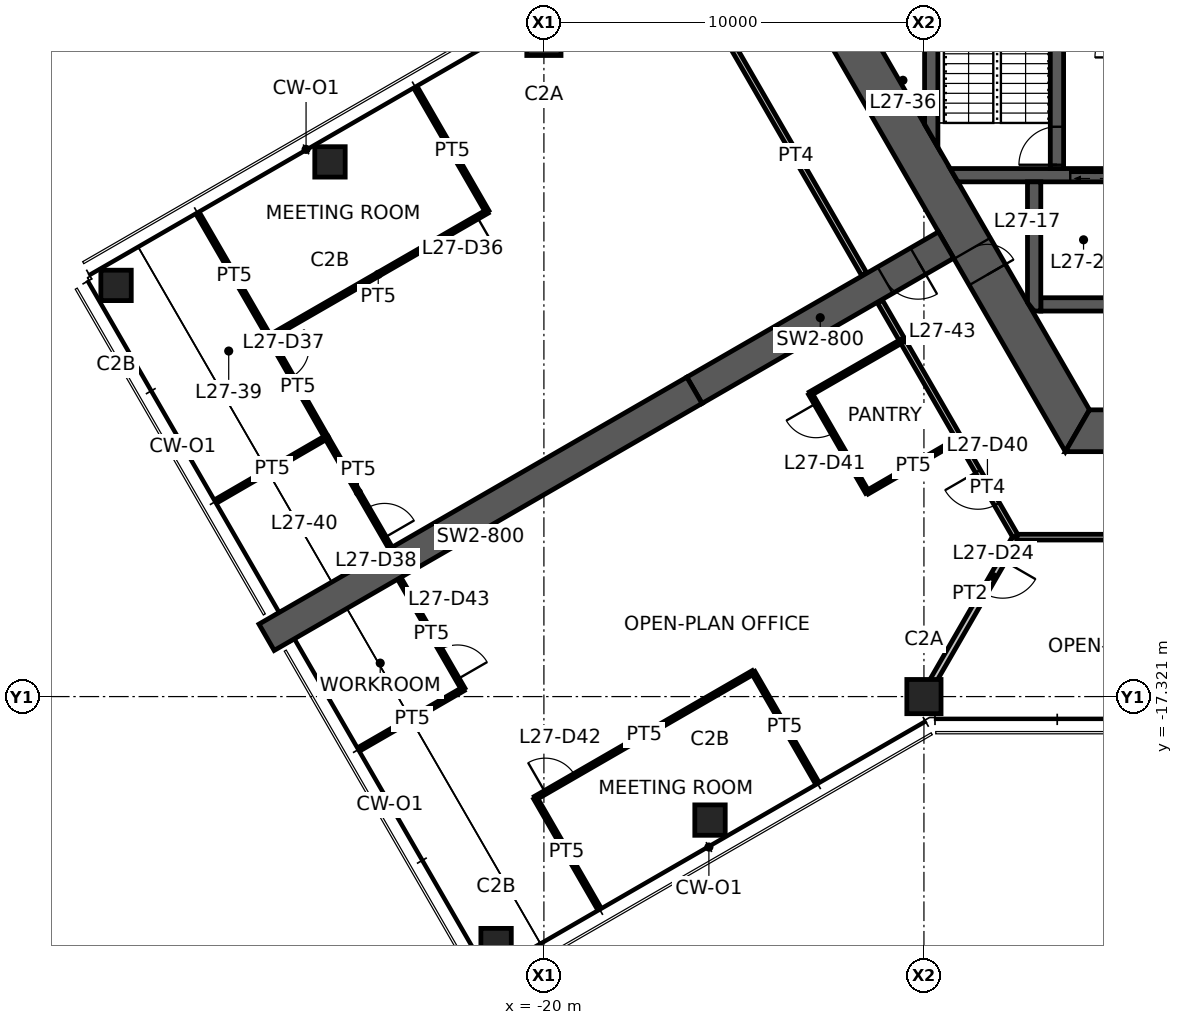
"""IFC4 building model, lengths in metres.
Left out: names, types, materials, properties, quantities, classifications, styles, units other than length and angle.
Written with IfcOpenShell. Run it as: python <this file> out.ifc"""

import sys

from ifc_helpers import new_model, si_unit, direction, frame, frame_2d, origin, origin_2d, place, context, subcontext, project, spatial, polyline, rectangle, hollow_rectangle, outline, extrude, element, fill, save


model = new_model("IFC4")
c1 = context("Model", 3, precision=1e-05, world=origin(), true_north=direction((0.0, 1.0)))
c2 = subcontext(c1, "Body", "Model", "MODEL_VIEW")
j1 = project(units=[si_unit("LENGTHUNIT", "METRE"), si_unit("PLANEANGLEUNIT", "RADIAN")], contexts=[c1])
p1 = place(None, origin())
s1 = spatial("IfcSite", under=j1, at=p1, CompositionType="ELEMENT")
p2 = place(p1, origin())
s2 = spatial("IfcBuilding", under=s1, at=p2, CompositionType="ELEMENT")
p3 = place(p2, frame((0.0, 0.0, 108.0)))
s3 = spatial("IfcBuildingStorey", under=s2, at=p3, CompositionType="ELEMENT", Elevation=108.0)
for number, where, z_axis, x_axis in (
    (1, (-20.0, 0.0, 0.0), (0.0, 0.0, 1.0), (1.0, 0.0, 0.0)),
    (2, (-10.0, -17.321, 0.0), (0.0, 0.0, 1.0), (1.0, 0.0, 0.0)),
):
    element("IfcColumn", number, at=place(p3, frame(where, z_axis=z_axis, x_axis=x_axis)), inside=s3, PredefinedType="COLUMN", context=c2, shape_type="SweptSolid", body=[
        extrude(hollow_rectangle(XDim=0.9, YDim=0.9, WallThickness=0.055, at=origin_2d()), origin(), (0.0, 0.0, 1.0), 3.9),
    ])
for number, where, z_axis, x_axis in (
    (3, (-25.629, -3.25, 0.0), (0.0, 0.0, 1.0), (1.0, 0.0, 0.0)),
    (4, (-31.258, -6.5, 0.0), (0.0, 0.0, 1.0), (1.0, 0.0, 0.0)),
    (5, (-15.629, -20.571, 0.0), (0.0, 0.0, 1.0), (1.0, 0.0, 0.0)),
    (6, (-21.258, -23.821, 0.0), (0.0, 0.0, 1.0), (1.0, 0.0, 0.0)),
):
    element("IfcColumn", number, at=place(p3, frame(where, z_axis=z_axis, x_axis=x_axis)), inside=s3, PredefinedType="COLUMN", context=c2, shape_type="SweptSolid", body=[
        extrude(hollow_rectangle(XDim=0.8, YDim=0.8, WallThickness=0.045, at=origin_2d()), origin(), (0.0, 0.0, 1.0), 3.9),
    ])
p4 = place(p3, frame((-11.922, 0.0, 0.0), z_axis=(0.0, 0.0, 1.0), x_axis=(0.500004296715, -0.866022923061, 0.0)))
e7 = element("IfcWall", 7, at=p4, inside=s3, PredefinedType="SHEAR", context=c2, shape_type="SweptSolid", body=[
    extrude(outline(polyline([(-0.318, -0.55), (6.381, -0.55), (7.181, -0.55), (12.24, -0.55), (11.605, 0.55), (7.181, 0.55), (6.381, 0.55), (0.318, 0.55), (-0.318, -0.55)])), origin(), (0.0, 0.0, 1.0), 3.9),
])
p5 = place(p4, frame((6.381, 0.0, 0.0)))
e8 = element("IfcOpeningElement", 8, at=p5, cuts=e7, PredefinedType="OPENING", context=c2, shape_type="SweptSolid", body=[
    extrude(rectangle(XDim=0.8, YDim=2.1, at=frame_2d((0.4, 1.05))), frame((0.0, 0.56, 0.0), z_axis=(0.0, -1.0, 0.0), x_axis=(1.0, 0.0, 0.0)), (0.0, 0.0, 1.0), 1.12),
])
p6 = place(p3, frame((-5.961, -10.325, 0.0), z_axis=(0.0, 0.0, 1.0), x_axis=(1.0, 0.0, 0.0)))
e9 = element("IfcWall", 9, at=p6, inside=s3, PredefinedType="SHEAR", context=c2, shape_type="SweptSolid", body=[
    extrude(outline(polyline([(-0.318, -0.55), (5.461, -0.55), (6.461, -0.55), (12.24, -0.55), (11.605, 0.55), (6.461, 0.55), (5.461, 0.55), (0.318, 0.55), (-0.318, -0.55)])), origin(), (0.0, 0.0, 1.0), 3.9),
])
p7 = place(p6, frame((5.461, 0.0, 0.0)))
e10 = element("IfcOpeningElement", 10, at=p7, cuts=e9, PredefinedType="OPENING", context=c2, shape_type="SweptSolid", body=[
    extrude(rectangle(XDim=1.0, YDim=2.1, at=frame_2d((0.5, 1.05))), frame((0.0, 0.56, 0.0), z_axis=(0.0, -1.0, 0.0), x_axis=(1.0, 0.0, 0.0)), (0.0, 0.0, 1.0), 1.12),
])
p8 = place(p3, frame((-9.418, -5.438, 0.0), z_axis=(0.0, 0.0, 1.0), x_axis=(-0.866029782078, -0.499992416496, 0.0)))
e11 = element("IfcWall", 11, at=p8, inside=s3, PredefinedType="SHEAR", context=c2, shape_type="SweptSolid", body=[
    extrude(rectangle(XDim=7.646, YDim=0.8, at=frame_2d((3.823, 0.0))), origin(), (0.0, 0.0, 1.0), 3.9),
])
p9 = place(p8, frame((0.85, 0.0, 0.0)))
e12 = element("IfcOpeningElement", 12, at=p9, cuts=e11, PredefinedType="OPENING", context=c2, shape_type="SweptSolid", body=[
    extrude(rectangle(XDim=1.0, YDim=2.1, at=frame_2d((0.5, 1.05))), frame((0.0, 0.41, 0.0), z_axis=(0.0, -1.0, 0.0), x_axis=(1.0, 0.0, 0.0)), (0.0, 0.0, 1.0), 0.82),
])
p10 = place(p3, frame((-16.039, -9.26, 0.0), z_axis=(0.0, 0.0, 1.0), x_axis=(-0.866024837091, -0.50000098154, 0.0)))
e13 = element("IfcWall", 13, at=p10, inside=s3, PredefinedType="SHEAR", context=c2, shape_type="SweptSolid", body=[
    extrude(rectangle(XDim=13.0, YDim=0.8, at=frame_2d((6.5, 0.0))), origin(), (0.0, 0.0, 1.0), 3.9),
])
p11 = place(p3, frame((-9.209, -3.6, 0.0), z_axis=(0.0, 0.0, 1.0), x_axis=(1.0, 0.0, 0.0)))
e14 = element("IfcWall", 14, at=p11, inside=s3, PredefinedType="SHEAR", context=c2, shape_type="SweptSolid", body=[
    extrude(outline(polyline([(0.101, -0.175), (3.059, -0.175), (4.359, -0.175), (5.609, -0.175), (6.709, -0.175), (7.784, -0.175), (7.784, 0.175), (6.709, 0.175), (5.609, 0.175), (4.359, 0.175), (3.059, 0.175), (-0.101, 0.175), (0.101, -0.175)])), origin(), (0.0, 0.0, 1.0), 3.9),
])
p12 = place(p11, frame((5.609, 0.0, 0.0)))
e15 = element("IfcOpeningElement", 15, at=p12, cuts=e14, PredefinedType="OPENING", context=c2, shape_type="SweptSolid", body=[
    extrude(rectangle(XDim=1.1, YDim=2.1, at=frame_2d((0.55, 1.05))), frame((0.0, 0.185, 0.0), z_axis=(0.0, -1.0, 0.0), x_axis=(1.0, 0.0, 0.0)), (0.0, 0.0, 1.0), 0.37),
])
p13 = place(p11, frame((3.059, 0.0, 0.0)))
e16 = element("IfcOpeningElement", 16, at=p13, cuts=e14, PredefinedType="OPENING", context=c2, shape_type="SweptSolid", body=[
    extrude(rectangle(XDim=1.3, YDim=2.1, at=frame_2d((0.65, 1.05))), frame((0.0, 0.185, 0.0), z_axis=(0.0, -1.0, 0.0), x_axis=(1.0, 0.0, 0.0)), (0.0, 0.0, 1.0), 0.37),
])
p14 = place(p3, frame((-6.5, -3.425, 0.0), z_axis=(0.0, 0.0, 1.0), x_axis=(0.0, 1.0, 0.0)))
e17 = element("IfcWall", 17, at=p14, inside=s3, PredefinedType="SHEAR", context=c2, shape_type="SweptSolid", body=[
    extrude(rectangle(XDim=6.85, YDim=0.35, at=frame_2d((3.425, 0.0))), origin(), (0.0, 0.0, 1.0), 3.9),
])
p15 = place(p14, frame((0.1, 0.0, 0.0)))
e18 = element("IfcOpeningElement", 18, at=p15, cuts=e17, PredefinedType="OPENING", context=c2, shape_type="SweptSolid", body=[
    extrude(rectangle(XDim=1.0, YDim=2.1, at=frame_2d((0.5, 1.05))), frame((0.0, 0.185, 0.0), z_axis=(0.0, -1.0, 0.0), x_axis=(1.0, 0.0, 0.0)), (0.0, 0.0, 1.0), 0.37),
])
p16 = place(p3, frame((-6.925, -7.0, 0.0), z_axis=(0.0, 0.0, 1.0), x_axis=(1.0, 0.0, 0.0)))
e19 = element("IfcWall", 19, at=p16, inside=s3, PredefinedType="SHEAR", context=c2, shape_type="SweptSolid", body=[
    extrude(rectangle(XDim=2.25, YDim=0.35, at=frame_2d((1.125, 0.0))), origin(), (0.0, 0.0, 1.0), 3.9),
])
p17 = place(p3, frame((-7.1, -3.775, 0.0), z_axis=(0.0, 0.0, 1.0), x_axis=(0.0, -1.0, 0.0)))
e20 = element("IfcWall", 20, at=p17, inside=s3, PredefinedType="SHEAR", context=c2, shape_type="SweptSolid", body=[
    extrude(outline(polyline([(0.0, -0.175), (3.175, -0.175), (3.4, 0.0), (3.4, 0.175), (0.0, 0.175), (0.0, -0.175)])), origin(), (0.0, 0.0, 1.0), 3.9),
])
p18 = place(p3, frame((-9.808, -2.562, 0.0), z_axis=(0.0, 0.0, 1.0), x_axis=(0.0, 1.0, 0.0)))
e21 = element("IfcWall", 21, at=p18, inside=s3, PredefinedType="SHEAR", context=c2, shape_type="SweptSolid", body=[
    extrude(outline(polyline([(-0.303, -0.175), (5.428, -0.175), (4.821, 0.175), (0.303, 0.175), (-0.303, -0.175)])), origin(), (0.0, 0.0, 1.0), 3.9),
])
p19 = place(p3, frame((-7.578, -13.125, 0.0), z_axis=(0.0, 0.0, 1.0), x_axis=(-0.500008905493, -0.866020262135, 0.0)))
e22 = element("IfcWall", 22, at=p19, inside=s3, PredefinedType="PARTITIONING", context=c2, shape_type="SweptSolid", body=[
    extrude(rectangle(XDim=4.845, YDim=0.175, at=frame_2d((2.422, 0.0))), origin(), (0.0, 0.0, 1.0), 3.05),
])
p20 = place(p19, frame((0.7, 0.0, 0.0)))
e23 = element("IfcOpeningElement", 23, at=p20, cuts=e22, PredefinedType="OPENING", context=c2, shape_type="SweptSolid", body=[
    extrude(rectangle(XDim=1.0, YDim=2.1, at=frame_2d((0.5, 1.05))), frame((0.0, 0.098, 0.0), z_axis=(0.0, -1.0, 0.0), x_axis=(1.0, 0.0, 0.0)), (0.0, 0.0, 1.0), 0.195),
])
p21 = place(p3, frame((-11.577, -6.199, 0.0), z_axis=(0.0, 0.0, 1.0), x_axis=(-0.500001961223, 0.866024271469, 0.0)))
e24 = element("IfcWall", 24, at=p21, inside=s3, PredefinedType="PARTITIONING", context=c2, shape_type="SweptSolid", body=[
    extrude(rectangle(XDim=7.158, YDim=0.15, at=frame_2d((3.579, 0.0))), origin(), (0.0, 0.0, 1.0), 2.95),
])
p22 = place(p3, frame((-27.22, -7.864, 0.0), z_axis=(0.0, 0.0, 1.0), x_axis=(-0.501296359072, 0.86527565572, 0.0)))
e25 = element("IfcWall", 25, at=p22, inside=s3, PredefinedType="PARTITIONING", context=c2, shape_type="SweptSolid", body=[
    extrude(rectangle(XDim=3.7, YDim=0.1, at=frame_2d((1.85, 0.0))), origin(), (0.0, 0.0, 1.0), 2.95),
])
p23 = place(p3, frame((-23.332, -1.37, 0.0), z_axis=(0.0, 0.0, 1.0), x_axis=(0.500013413428, -0.866017659399, 0.0)))
e26 = element("IfcWall", 26, at=p23, inside=s3, PredefinedType="PARTITIONING", context=c2, shape_type="SweptSolid", body=[
    extrude(rectangle(XDim=3.68, YDim=0.1, at=frame_2d((1.84, 0.0))), origin(), (0.0, 0.0, 1.0), 2.95),
])
p24 = place(p3, frame((-21.492, -4.557, 0.0), z_axis=(0.0, 0.0, 1.0), x_axis=(-0.866343956507, -0.499447844147, 0.0)))
e27 = element("IfcWall", 27, at=p24, inside=s3, PredefinedType="PARTITIONING", context=c2, shape_type="SweptSolid", body=[
    extrude(rectangle(XDim=6.62, YDim=0.1, at=frame_2d((3.31, 0.0))), origin(), (0.0, 0.0, 1.0), 2.95),
])
p25 = place(p24, frame((0.3, 0.0, 0.0)))
e28 = element("IfcOpeningElement", 28, at=p25, cuts=e27, PredefinedType="OPENING", context=c2, shape_type="SweptSolid", body=[
    extrude(rectangle(XDim=0.9, YDim=2.1, at=frame_2d((0.45, 1.05))), frame((0.0, 0.06, 0.0), z_axis=(0.0, -1.0, 0.0), x_axis=(1.0, 0.0, 0.0)), (0.0, 0.0, 1.0), 0.12),
])
p26 = place(p3, frame((-25.719, -10.493, 0.0), z_axis=(0.0, 0.0, 1.0), x_axis=(-0.865269267775, -0.501307384988, 0.0)))
e29 = element("IfcWall", 29, at=p26, inside=s3, PredefinedType="PARTITIONING", context=c2, shape_type="SweptSolid", body=[
    extrude(rectangle(XDim=3.301, YDim=0.1, at=frame_2d((1.65, 0.0))), origin(), (0.0, 0.0, 1.0), 2.95),
])
p27 = place(p3, frame((-27.227, -7.863, 0.0), z_axis=(0.0, 0.0, 1.0), x_axis=(0.495913871635, -0.868371712989, 0.0)))
e30 = element("IfcWall", 30, at=p27, inside=s3, PredefinedType="PARTITIONING", context=c2, shape_type="SweptSolid", body=[
    extrude(rectangle(XDim=3.038, YDim=0.1, at=frame_2d((1.519, 0.0))), origin(), (0.0, 0.0, 1.0), 2.95),
])
p28 = place(p27, frame((0.3, 0.0, 0.0)))
e31 = element("IfcOpeningElement", 31, at=p28, cuts=e30, PredefinedType="OPENING", context=c2, shape_type="SweptSolid", body=[
    extrude(rectangle(XDim=0.9, YDim=2.1, at=frame_2d((0.45, 1.05))), frame((0.0, 0.06, 0.0), z_axis=(0.0, -1.0, 0.0), x_axis=(1.0, 0.0, 0.0)), (0.0, 0.0, 1.0), 0.12),
])
p29 = place(p3, frame((-25.72, -10.5, 0.0), z_axis=(0.0, 0.0, 1.0), x_axis=(0.501088030279, -0.865396317251, 0.0)))
e32 = element("IfcWall", 32, at=p29, inside=s3, PredefinedType="PARTITIONING", context=c2, shape_type="SweptSolid", body=[
    extrude(rectangle(XDim=3.347, YDim=0.1, at=frame_2d((1.673, 0.0))), origin(), (0.0, 0.0, 1.0), 2.95),
])
p30 = place(p29, frame((2.147, 0.0, 0.0)))
e33 = element("IfcOpeningElement", 33, at=p30, cuts=e32, PredefinedType="OPENING", context=c2, shape_type="SweptSolid", body=[
    extrude(rectangle(XDim=0.9, YDim=2.1, at=frame_2d((0.45, 1.05))), frame((0.0, 0.06, 0.0), z_axis=(0.0, -1.0, 0.0), x_axis=(1.0, 0.0, 0.0)), (0.0, 0.0, 1.0), 0.12),
])
p31 = place(p3, frame((-9.064, -10.551, 0.0), z_axis=(0.0, 0.0, 1.0), x_axis=(-0.499977562641, 0.866038357612, 0.0)))
e34 = element("IfcWall", 34, at=p31, inside=s3, PredefinedType="PARTITIONING", context=c2, shape_type="SweptSolid", body=[
    extrude(rectangle(XDim=3.01, YDim=0.15, at=frame_2d((1.505, 0.0))), origin(), (0.0, 0.0, 1.0), 2.95),
])
p32 = place(p3, frame((-10.564, -7.952, 0.0), z_axis=(0.0, 0.0, 1.0), x_axis=(-0.500085263423, 0.865976171327, 0.0)))
e35 = element("IfcWall", 35, at=p32, inside=s3, PredefinedType="PARTITIONING", context=c2, shape_type="SweptSolid", body=[
    extrude(rectangle(XDim=1.184, YDim=0.15, at=frame_2d((0.592, 0.0))), origin(), (0.0, 0.0, 1.0), 2.95),
])
p33 = place(p3, frame((-7.589, -13.105, 0.0), z_axis=(0.0, 0.0, 1.0), x_axis=(-0.499972416139, 0.866041328748, 0.0)))
e36 = element("IfcWall", 36, at=p33, inside=s3, PredefinedType="PARTITIONING", context=c2, shape_type="SweptSolid", body=[
    extrude(rectangle(XDim=2.959, YDim=0.15, at=frame_2d((1.479, 0.0))), origin(), (0.0, 0.0, 1.0), 2.95),
])
p34 = place(p33, frame((0.979, 0.0, 0.0)))
e37 = element("IfcOpeningElement", 37, at=p34, cuts=e36, PredefinedType="OPENING", context=c2, shape_type="SweptSolid", body=[
    extrude(rectangle(XDim=1.0, YDim=2.1, at=frame_2d((0.5, 1.05))), frame((0.0, 0.085, 0.0), z_axis=(0.0, -1.0, 0.0), x_axis=(1.0, 0.0, 0.0)), (0.0, 0.0, 1.0), 0.17),
])
p35 = place(p3, frame((-12.991, -9.348, 0.0), z_axis=(0.0, 0.0, 1.0), x_axis=(0.866817750494, 0.498625097071, 0.0)))
e38 = element("IfcWall", 38, at=p35, inside=s3, PredefinedType="PARTITIONING", context=c2, shape_type="SweptSolid", body=[
    extrude(rectangle(XDim=2.8, YDim=0.1, at=frame_2d((1.4, 0.0))), origin(), (0.0, 0.0, 1.0), 2.95),
])
p36 = place(p3, frame((-11.491, -11.946, 0.0), z_axis=(0.0, 0.0, 1.0), x_axis=(-0.499990139034, 0.866031096941, 0.0)))
e39 = element("IfcWall", 39, at=p36, inside=s3, PredefinedType="PARTITIONING", context=c2, shape_type="SweptSolid", body=[
    extrude(rectangle(XDim=3.0, YDim=0.1, at=frame_2d((1.5, 0.0))), origin(), (0.0, 0.0, 1.0), 2.95),
])
p37 = place(p36, frame((1.8, 0.0, 0.0)))
e40 = element("IfcOpeningElement", 40, at=p37, cuts=e39, PredefinedType="OPENING", context=c2, shape_type="SweptSolid", body=[
    extrude(rectangle(XDim=0.9, YDim=2.1, at=frame_2d((0.45, 1.05))), frame((0.0, 0.06, 0.0), z_axis=(0.0, -1.0, 0.0), x_axis=(1.0, 0.0, 0.0)), (0.0, 0.0, 1.0), 0.12),
])
p38 = place(p3, frame((-9.069, -10.542, 0.0), z_axis=(0.0, 0.0, 1.0), x_axis=(-0.865195372903, -0.501434907746, 0.0)))
e41 = element("IfcWall", 41, at=p38, inside=s3, PredefinedType="PARTITIONING", context=c2, shape_type="SweptSolid", body=[
    extrude(rectangle(XDim=2.8, YDim=0.1, at=frame_2d((1.4, 0.0))), origin(), (0.0, 0.0, 1.0), 2.95),
])
p39 = place(p3, frame((-20.225, -19.991, 0.0), z_axis=(0.0, 0.0, 1.0), x_axis=(0.866030817826, 0.499990622488, 0.0)))
e42 = element("IfcWall", 42, at=p39, inside=s3, PredefinedType="PARTITIONING", context=c2, shape_type="SweptSolid", body=[
    extrude(rectangle(XDim=6.62, YDim=0.1, at=frame_2d((3.31, 0.0))), origin(), (0.0, 0.0, 1.0), 2.95),
])
p40 = place(p39, frame((0.3, 0.0, 0.0)))
e43 = element("IfcOpeningElement", 43, at=p40, cuts=e42, PredefinedType="OPENING", context=c2, shape_type="SweptSolid", body=[
    extrude(rectangle(XDim=0.9, YDim=2.1, at=frame_2d((0.45, 1.05))), frame((0.0, 0.06, 0.0), z_axis=(0.0, -1.0, 0.0), x_axis=(1.0, 0.0, 0.0)), (0.0, 0.0, 1.0), 0.12),
])
p41 = place(p3, frame((-18.585, -22.831, 0.0), z_axis=(0.0, 0.0, 1.0), x_axis=(-0.50002956483, 0.866008333849, 0.0)))
e44 = element("IfcWall", 44, at=p41, inside=s3, PredefinedType="PARTITIONING", context=c2, shape_type="SweptSolid", body=[
    extrude(rectangle(XDim=3.28, YDim=0.1, at=frame_2d((1.64, 0.0))), origin(), (0.0, 0.0, 1.0), 2.95),
])
p42 = place(p3, frame((-14.492, -16.681, 0.0), z_axis=(0.0, 0.0, 1.0), x_axis=(0.499974350878, -0.866040211805, 0.0)))
e45 = element("IfcWall", 45, at=p42, inside=s3, PredefinedType="PARTITIONING", context=c2, shape_type="SweptSolid", body=[
    extrude(rectangle(XDim=3.3, YDim=0.1, at=frame_2d((1.65, 0.0))), origin(), (0.0, 0.0, 1.0), 2.95),
])
p43 = place(p3, frame((-23.797, -14.224, 0.0), z_axis=(0.0, 0.0, 1.0), x_axis=(0.500015043844, -0.866016718043, 0.0)))
e46 = element("IfcWall", 46, at=p43, inside=s3, PredefinedType="PARTITIONING", context=c2, shape_type="SweptSolid", body=[
    extrude(rectangle(XDim=3.347, YDim=0.1, at=frame_2d((1.673, 0.0))), origin(), (0.0, 0.0, 1.0), 2.95),
])
p44 = place(p43, frame((2.147, 0.0, 0.0)))
e47 = element("IfcOpeningElement", 47, at=p44, cuts=e46, PredefinedType="OPENING", context=c2, shape_type="SweptSolid", body=[
    extrude(rectangle(XDim=0.9, YDim=2.1, at=frame_2d((0.45, 1.05))), frame((0.0, 0.06, 0.0), z_axis=(0.0, -1.0, 0.0), x_axis=(1.0, 0.0, 0.0)), (0.0, 0.0, 1.0), 0.12),
])
p45 = place(p3, frame((-22.123, -17.122, 0.0), z_axis=(0.0, 0.0, 1.0), x_axis=(-0.86602952684, -0.49999285859, 0.0)))
e48 = element("IfcWall", 48, at=p45, inside=s3, PredefinedType="PARTITIONING", context=c2, shape_type="SweptSolid", body=[
    extrude(rectangle(XDim=3.1, YDim=0.1, at=frame_2d((1.55, 0.0))), origin(), (0.0, 0.0, 1.0), 2.95),
])
p46 = place(p3, frame((3.251, -13.125, 0.0), z_axis=(0.0, 0.0, 1.0), x_axis=(-1.0, 0.0, 0.0)))
e49 = element("IfcWall", 49, at=p46, inside=s3, PredefinedType="PARTITIONING", context=c2, shape_type="SweptSolid", body=[
    extrude(rectangle(XDim=10.806, YDim=0.15, at=frame_2d((5.403, 0.0))), origin(), (0.0, 0.0, 1.0), 2.95),
])
p47 = place(p46, frame((4.903, 0.0, 0.0)))
e50 = element("IfcOpeningElement", 50, at=p47, cuts=e49, PredefinedType="OPENING", context=c2, shape_type="SweptSolid", body=[
    extrude(rectangle(XDim=1.0, YDim=2.1, at=frame_2d((0.5, 1.05))), frame((0.0, 0.085, 0.0), z_axis=(0.0, -1.0, 0.0), x_axis=(1.0, 0.0, 0.0)), (0.0, 0.0, 1.0), 0.17),
])
p48 = place(p5, origin())
e51 = element("IfcDoor", 51, at=p48, inside=s3, OperationType="SINGLE_SWING_RIGHT", PredefinedType="DOOR", context=c2, shape_type="SweptSolid", body=[
    extrude(rectangle(XDim=0.8, YDim=2.1, at=frame_2d((0.4, 1.05))), frame((0.0, 0.025, 0.0), z_axis=(0.0, -1.0, 0.0), x_axis=(1.0, 0.0, 0.0)), (0.0, 0.0, 1.0), 0.05),
])
fill(e8, e51)
p49 = place(p15, origin())
e52 = element("IfcDoor", 52, at=p49, inside=s3, OperationType="SINGLE_SWING_LEFT", PredefinedType="DOOR", context=c2, shape_type="SweptSolid", body=[
    extrude(rectangle(XDim=1.0, YDim=2.1, at=frame_2d((0.5, 1.05))), frame((0.0, 0.025, 0.0), z_axis=(0.0, -1.0, 0.0), x_axis=(1.0, 0.0, 0.0)), (0.0, 0.0, 1.0), 0.05),
])
fill(e18, e52)
p50 = place(p9, origin())
e53 = element("IfcDoor", 53, at=p50, inside=s3, OperationType="SINGLE_SWING_LEFT", PredefinedType="DOOR", context=c2, shape_type="SweptSolid", body=[
    extrude(rectangle(XDim=1.0, YDim=2.1, at=frame_2d((0.5, 1.05))), frame((0.0, 0.025, 0.0), z_axis=(0.0, -1.0, 0.0), x_axis=(1.0, 0.0, 0.0)), (0.0, 0.0, 1.0), 0.05),
])
fill(e12, e53)
p51 = place(p20, origin())
e54 = element("IfcDoor", 54, at=p51, inside=s3, OperationType="SINGLE_SWING_LEFT", PredefinedType="DOOR", context=c2, shape_type="SweptSolid", body=[
    extrude(rectangle(XDim=1.0, YDim=2.1, at=frame_2d((0.5, 1.05))), frame((0.0, 0.025, 0.0), z_axis=(0.0, -1.0, 0.0), x_axis=(1.0, 0.0, 0.0)), (0.0, 0.0, 1.0), 0.05),
])
fill(e23, e54)
p52 = place(p25, origin())
e55 = element("IfcDoor", 55, at=p52, inside=s3, OperationType="SINGLE_SWING_LEFT", PredefinedType="DOOR", context=c2, shape_type="SweptSolid", body=[
    extrude(rectangle(XDim=0.9, YDim=2.1, at=frame_2d((0.45, 1.05))), frame((0.0, 0.025, 0.0), z_axis=(0.0, -1.0, 0.0), x_axis=(1.0, 0.0, 0.0)), (0.0, 0.0, 1.0), 0.05),
])
fill(e28, e55)
p53 = place(p28, origin())
e56 = element("IfcDoor", 56, at=p53, inside=s3, OperationType="SINGLE_SWING_LEFT", PredefinedType="DOOR", context=c2, shape_type="SweptSolid", body=[
    extrude(rectangle(XDim=0.9, YDim=2.1, at=frame_2d((0.45, 1.05))), frame((0.0, 0.025, 0.0), z_axis=(0.0, -1.0, 0.0), x_axis=(1.0, 0.0, 0.0)), (0.0, 0.0, 1.0), 0.05),
])
fill(e31, e56)
p54 = place(p30, origin())
e57 = element("IfcDoor", 57, at=p54, inside=s3, OperationType="SINGLE_SWING_RIGHT", PredefinedType="DOOR", context=c2, shape_type="SweptSolid", body=[
    extrude(rectangle(XDim=0.9, YDim=2.1, at=frame_2d((0.45, 1.05))), frame((0.0, 0.025, 0.0), z_axis=(0.0, -1.0, 0.0), x_axis=(1.0, 0.0, 0.0)), (0.0, 0.0, 1.0), 0.05),
])
fill(e33, e57)
p55 = place(p34, origin())
e58 = element("IfcDoor", 58, at=p55, inside=s3, OperationType="SINGLE_SWING_RIGHT", PredefinedType="DOOR", context=c2, shape_type="SweptSolid", body=[
    extrude(rectangle(XDim=1.0, YDim=2.1, at=frame_2d((0.5, 1.05))), frame((0.0, 0.025, 0.0), z_axis=(0.0, -1.0, 0.0), x_axis=(1.0, 0.0, 0.0)), (0.0, 0.0, 1.0), 0.05),
])
fill(e37, e58)
p56 = place(p37, origin())
e59 = element("IfcDoor", 59, at=p56, inside=s3, OperationType="SINGLE_SWING_RIGHT", PredefinedType="DOOR", context=c2, shape_type="SweptSolid", body=[
    extrude(rectangle(XDim=0.9, YDim=2.1, at=frame_2d((0.45, 1.05))), frame((0.0, 0.025, 0.0), z_axis=(0.0, -1.0, 0.0), x_axis=(1.0, 0.0, 0.0)), (0.0, 0.0, 1.0), 0.05),
])
fill(e40, e59)
p57 = place(p40, origin())
e60 = element("IfcDoor", 60, at=p57, inside=s3, OperationType="SINGLE_SWING_LEFT", PredefinedType="DOOR", context=c2, shape_type="SweptSolid", body=[
    extrude(rectangle(XDim=0.9, YDim=2.1, at=frame_2d((0.45, 1.05))), frame((0.0, 0.025, 0.0), z_axis=(0.0, -1.0, 0.0), x_axis=(1.0, 0.0, 0.0)), (0.0, 0.0, 1.0), 0.05),
])
fill(e43, e60)
p58 = place(p44, origin())
e61 = element("IfcDoor", 61, at=p58, inside=s3, OperationType="SINGLE_SWING_RIGHT", PredefinedType="DOOR", context=c2, shape_type="SweptSolid", body=[
    extrude(rectangle(XDim=0.9, YDim=2.1, at=frame_2d((0.45, 1.05))), frame((0.0, 0.025, 0.0), z_axis=(0.0, -1.0, 0.0), x_axis=(1.0, 0.0, 0.0)), (0.0, 0.0, 1.0), 0.05),
])
fill(e47, e61)
p59 = place(p13, origin())
e62 = element("IfcDoor", 62, at=p59, inside=s3, OperationType="DOUBLE_DOOR_SLIDING", PredefinedType="DOOR", context=c2, shape_type="SweptSolid", body=[
    extrude(rectangle(XDim=1.3, YDim=2.1, at=frame_2d((0.65, 1.05))), frame((0.0, 0.025, 0.0), z_axis=(0.0, -1.0, 0.0), x_axis=(1.0, 0.0, 0.0)), (0.0, 0.0, 1.0), 0.05),
])
fill(e16, e62)
save(model, sys.argv[1])
